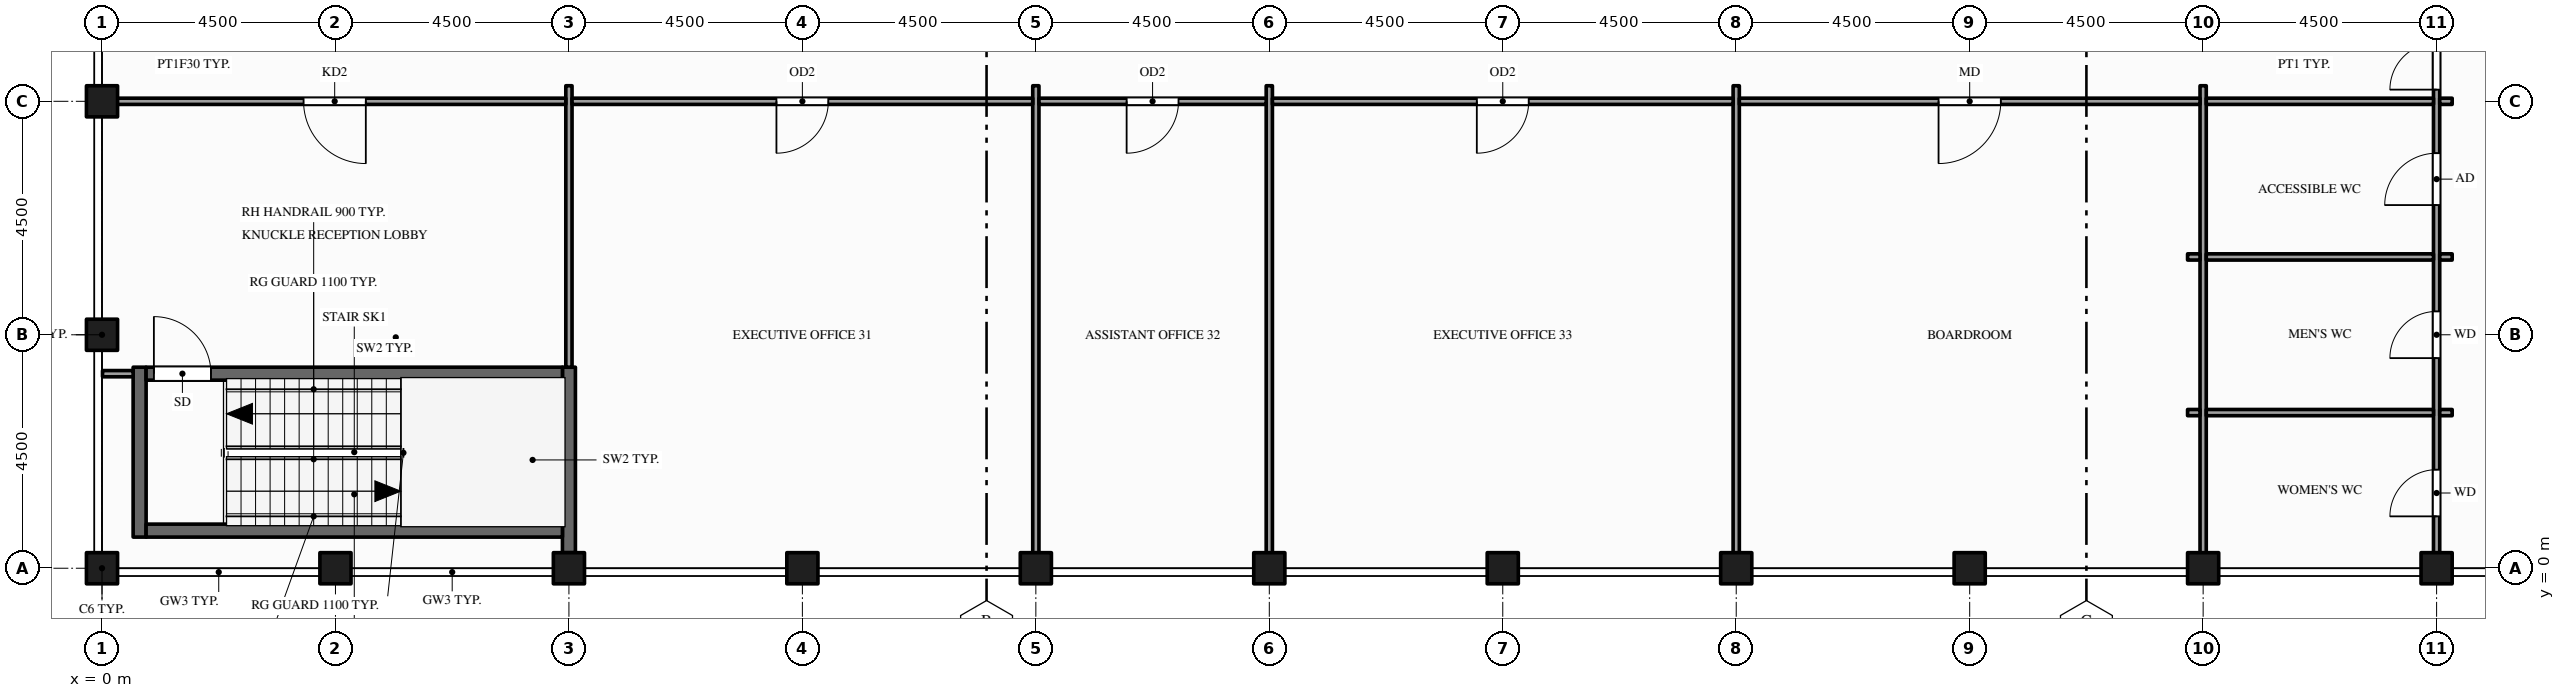
"""IFC4 building model, lengths in metres.
Left out: names, types, materials, properties, quantities, classifications, styles, units other than length and angle.
Written with IfcOpenShell. Run it as: python <this file> out.ifc"""

import sys

from ifc_helpers import new_model, si_unit, direction, frame, frame_2d, origin, origin_2d, place, context, subcontext, project, spatial, rectangle, hollow_rectangle, extrude, element, fill, save


model = new_model("IFC4")
c1 = context("Model", 3, precision=1e-05, world=origin(), true_north=direction((0.0, 1.0)))
c2 = subcontext(c1, "Body", "Model", "MODEL_VIEW")
j1 = project(units=[si_unit("LENGTHUNIT", "METRE"), si_unit("PLANEANGLEUNIT", "RADIAN")], contexts=[c1])
p1 = place(None, origin())
s1 = spatial("IfcSite", under=j1, at=p1, CompositionType="ELEMENT")
p2 = place(p1, origin())
s2 = spatial("IfcBuilding", under=s1, at=p2, CompositionType="ELEMENT")
p3 = place(p2, frame((0.0, 0.0, 305.0)))
s3 = spatial("IfcBuildingStorey", under=s2, at=p3, CompositionType="ELEMENT", Elevation=305.0)
for number, where, z_axis, x_axis in (
    (1, (0.0, 0.0, -0.15), (0.0, 0.0, 1.0), (1.0, 0.0, 0.0)),
    (2, (0.0, 4.5, -0.15), (0.0, 0.0, 1.0), (1.0, 0.0, 0.0)),
    (3, (0.0, 9.0, -0.15), (0.0, 0.0, 1.0), (1.0, 0.0, 0.0)),
    (4, (4.5, 0.0, -0.15), (0.0, 0.0, 1.0), (1.0, 0.0, 0.0)),
    (5, (9.0, 0.0, -0.15), (0.0, 0.0, 1.0), (1.0, 0.0, 0.0)),
    (6, (13.5, 0.0, -0.15), (0.0, 0.0, 1.0), (1.0, 0.0, 0.0)),
    (7, (18.0, 0.0, -0.15), (0.0, 0.0, 1.0), (1.0, 0.0, 0.0)),
    (8, (22.5, 0.0, -0.15), (0.0, 0.0, 1.0), (1.0, 0.0, 0.0)),
    (9, (27.0, 0.0, -0.15), (0.0, 0.0, 1.0), (1.0, 0.0, 0.0)),
    (10, (31.5, 0.0, -0.15), (0.0, 0.0, 1.0), (1.0, 0.0, 0.0)),
    (11, (36.0, 0.0, -0.15), (0.0, 0.0, 1.0), (1.0, 0.0, 0.0)),
    (12, (40.5, 0.0, -0.15), (0.0, 0.0, 1.0), (1.0, 0.0, 0.0)),
    (13, (45.0, 0.0, -0.15), (0.0, 0.0, 1.0), (1.0, 0.0, 0.0)),
):
    element("IfcColumn", number, at=place(p3, frame(where, z_axis=z_axis, x_axis=x_axis)), inside=s3, PredefinedType="COLUMN", context=c2, shape_type="SweptSolid", body=[
        extrude(hollow_rectangle(XDim=0.6, YDim=0.6, WallThickness=0.03, at=origin_2d()), origin(), (0.0, 0.0, 1.0), 4.5),
    ])
p4 = place(p3, frame((0.725, 0.6, 0.0), z_axis=(0.0, 0.0, 1.0), x_axis=(0.0, 1.0, 0.0)))
e14 = element("IfcWall", 14, at=p4, inside=s3, PredefinedType="SHEAR", context=c2, shape_type="SweptSolid", body=[
    extrude(rectangle(XDim=3.275, YDim=0.25, at=frame_2d((1.637, 0.0))), origin(), (0.0, 0.0, 1.0), 4.35),
])
p5 = place(p3, frame((9.0, 0.3, 0.0), z_axis=(0.0, 0.0, 1.0), x_axis=(0.0, 1.0, 0.0)))
e15 = element("IfcWall", 15, at=p5, inside=s3, PredefinedType="SHEAR", context=c2, shape_type="SweptSolid", body=[
    extrude(rectangle(XDim=3.575, YDim=0.25, at=frame_2d((1.788, 0.0))), origin(), (0.0, 0.0, 1.0), 4.35),
])
p6 = place(p3, frame((9.0, 3.875, 0.0), z_axis=(0.0, 0.0, 1.0), x_axis=(0.0, 1.0, 0.0)))
e16 = element("IfcWall", 16, at=p6, inside=s3, PredefinedType="PARTITIONING", context=c2, shape_type="SweptSolid", body=[
    extrude(rectangle(XDim=5.425, YDim=0.12, at=frame_2d((2.712, 0.0))), origin(), (0.0, 0.0, 1.0), 3.359),
])
for number, where, z_axis, x_axis in (
    (17, (18.0, 0.01, 0.0), (0.0, 0.0, 1.0), (0.0, 1.0, 0.0)),
    (18, (22.5, 0.01, 0.0), (0.0, 0.0, 1.0), (0.0, 1.0, 0.0)),
    (19, (31.5, 0.01, 0.0), (0.0, 0.0, 1.0), (0.0, 1.0, 0.0)),
    (20, (40.5, 0.01, 0.0), (0.0, 0.0, 1.0), (0.0, 1.0, 0.0)),
):
    element("IfcWall", number, at=place(p3, frame(where, z_axis=z_axis, x_axis=x_axis)), inside=s3, PredefinedType="PARTITIONING", context=c2, shape_type="SweptSolid", body=[
        extrude(rectangle(XDim=9.29, YDim=0.12, at=frame_2d((4.645, 0.0))), origin(), (0.0, 0.0, 1.0), 3.359),
    ])
p7 = place(p3, frame((45.0, 0.01, 0.0), z_axis=(0.0, 0.0, 1.0), x_axis=(0.0, 1.0, 0.0)))
e21 = element("IfcWall", 21, at=p7, inside=s3, PredefinedType="PARTITIONING", context=c2, shape_type="SweptSolid", body=[
    extrude(rectangle(XDim=22.48, YDim=0.12, at=frame_2d((11.24, 0.0))), origin(), (0.0, 0.0, 1.0), 3.359),
])
p8 = place(p7, frame((9.215, 0.0, 0.0)))
e22 = element("IfcOpeningElement", 22, at=p8, cuts=e21, PredefinedType="OPENING", context=c2, shape_type="SweptSolid", body=[
    extrude(rectangle(XDim=1.8, YDim=2.1, at=frame_2d((0.9, 1.05))), frame((0.0, 0.07, 0.0), z_axis=(0.0, -1.0, 0.0), x_axis=(1.0, 0.0, 0.0)), (0.0, 0.0, 1.0), 0.14),
])
p9 = place(p7, frame((0.99, 0.0, 0.0)))
e23 = element("IfcOpeningElement", 23, at=p9, cuts=e21, PredefinedType="OPENING", context=c2, shape_type="SweptSolid", body=[
    extrude(rectangle(XDim=0.9, YDim=2.1, at=frame_2d((0.45, 1.05))), frame((0.0, 0.07, 0.0), z_axis=(0.0, -1.0, 0.0), x_axis=(1.0, 0.0, 0.0)), (0.0, 0.0, 1.0), 0.14),
])
p10 = place(p7, frame((4.04, 0.0, 0.0)))
e24 = element("IfcOpeningElement", 24, at=p10, cuts=e21, PredefinedType="OPENING", context=c2, shape_type="SweptSolid", body=[
    extrude(rectangle(XDim=0.9, YDim=2.1, at=frame_2d((0.45, 1.05))), frame((0.0, 0.07, 0.0), z_axis=(0.0, -1.0, 0.0), x_axis=(1.0, 0.0, 0.0)), (0.0, 0.0, 1.0), 0.14),
])
p11 = place(p7, frame((6.99, 0.0, 0.0)))
e25 = element("IfcOpeningElement", 25, at=p11, cuts=e21, PredefinedType="OPENING", context=c2, shape_type="SweptSolid", body=[
    extrude(rectangle(XDim=1.0, YDim=2.1, at=frame_2d((0.5, 1.05))), frame((0.0, 0.07, 0.0), z_axis=(0.0, -1.0, 0.0), x_axis=(1.0, 0.0, 0.0)), (0.0, 0.0, 1.0), 0.14),
])
p12 = place(p3, frame((0.85, 0.725, 0.0), z_axis=(0.0, 0.0, 1.0), x_axis=(1.0, 0.0, 0.0)))
e26 = element("IfcWall", 26, at=p12, inside=s3, PredefinedType="SHEAR", context=c2, shape_type="SweptSolid", body=[
    extrude(rectangle(XDim=8.025, YDim=0.25, at=frame_2d((4.012, 0.0))), origin(), (0.0, 0.0, 1.0), 4.35),
])
p13 = place(p3, frame((40.2, 3.0, 0.0), z_axis=(0.0, 0.0, 1.0), x_axis=(1.0, 0.0, 0.0)))
e27 = element("IfcWall", 27, at=p13, inside=s3, PredefinedType="PARTITIONING", context=c2, shape_type="SweptSolid", body=[
    extrude(rectangle(XDim=0.24, YDim=0.12, at=frame_2d((0.12, 0.0))), origin(), (0.0, 0.0, 1.0), 3.359),
])
p14 = place(p3, frame((40.56, 3.0, 0.0), z_axis=(0.0, 0.0, 1.0), x_axis=(1.0, 0.0, 0.0)))
e28 = element("IfcWall", 28, at=p14, inside=s3, PredefinedType="PARTITIONING", context=c2, shape_type="SweptSolid", body=[
    extrude(rectangle(XDim=4.38, YDim=0.12, at=frame_2d((2.19, 0.0))), origin(), (0.0, 0.0, 1.0), 3.359),
])
p15 = place(p3, frame((45.06, 3.0, 0.0), z_axis=(0.0, 0.0, 1.0), x_axis=(1.0, 0.0, 0.0)))
e29 = element("IfcWall", 29, at=p15, inside=s3, PredefinedType="PARTITIONING", context=c2, shape_type="SweptSolid", body=[
    extrude(rectangle(XDim=0.24, YDim=0.12, at=frame_2d((0.12, 0.0))), origin(), (0.0, 0.0, 1.0), 3.359),
])
p16 = place(p3, frame((0.01, 3.75, 0.0), z_axis=(0.0, 0.0, 1.0), x_axis=(1.0, 0.0, 0.0)))
e30 = element("IfcWall", 30, at=p16, inside=s3, PredefinedType="PARTITIONING", context=c2, shape_type="SweptSolid", body=[
    extrude(rectangle(XDim=0.59, YDim=0.12, at=frame_2d((0.295, 0.0))), origin(), (0.0, 0.0, 1.0), 3.672),
])
p17 = place(p3, frame((0.85, 3.75, 0.0), z_axis=(0.0, 0.0, 1.0), x_axis=(1.0, 0.0, 0.0)))
e31 = element("IfcWall", 31, at=p17, inside=s3, PredefinedType="SHEAR", context=c2, shape_type="SweptSolid", body=[
    extrude(rectangle(XDim=8.025, YDim=0.25, at=frame_2d((4.012, 0.0))), origin(), (0.0, 0.0, 1.0), 4.35),
])
p18 = place(p17, frame((0.15, 0.0, 0.0)))
e32 = element("IfcOpeningElement", 32, at=p18, cuts=e31, PredefinedType="OPENING", context=c2, shape_type="SweptSolid", body=[
    extrude(rectangle(XDim=1.1, YDim=2.1, at=frame_2d((0.55, 1.05))), frame((0.0, 0.135, 0.0), z_axis=(0.0, -1.0, 0.0), x_axis=(1.0, 0.0, 0.0)), (0.0, 0.0, 1.0), 0.27),
])
p19 = place(p3, frame((40.2, 6.0, 0.0), z_axis=(0.0, 0.0, 1.0), x_axis=(1.0, 0.0, 0.0)))
e33 = element("IfcWall", 33, at=p19, inside=s3, PredefinedType="PARTITIONING", context=c2, shape_type="SweptSolid", body=[
    extrude(rectangle(XDim=0.24, YDim=0.12, at=frame_2d((0.12, 0.0))), origin(), (0.0, 0.0, 1.0), 3.359),
])
p20 = place(p3, frame((40.56, 6.0, 0.0), z_axis=(0.0, 0.0, 1.0), x_axis=(1.0, 0.0, 0.0)))
e34 = element("IfcWall", 34, at=p20, inside=s3, PredefinedType="PARTITIONING", context=c2, shape_type="SweptSolid", body=[
    extrude(rectangle(XDim=4.38, YDim=0.12, at=frame_2d((2.19, 0.0))), origin(), (0.0, 0.0, 1.0), 3.359),
])
p21 = place(p3, frame((45.06, 6.0, 0.0), z_axis=(0.0, 0.0, 1.0), x_axis=(1.0, 0.0, 0.0)))
e35 = element("IfcWall", 35, at=p21, inside=s3, PredefinedType="PARTITIONING", context=c2, shape_type="SweptSolid", body=[
    extrude(rectangle(XDim=0.24, YDim=0.12, at=frame_2d((0.12, 0.0))), origin(), (0.0, 0.0, 1.0), 3.359),
])
p22 = place(p3, frame((0.01, 9.0, 0.0), z_axis=(0.0, 0.0, 1.0), x_axis=(1.0, 0.0, 0.0)))
e36 = element("IfcWall", 36, at=p22, inside=s3, PredefinedType="PARTITIONING", context=c2, shape_type="SweptSolid", body=[
    extrude(rectangle(XDim=8.93, YDim=0.12, at=frame_2d((4.465, 0.0))), origin(), (0.0, 0.0, 1.0), 3.359),
])
p23 = place(p22, frame((3.875, 0.0, 0.0)))
e37 = element("IfcOpeningElement", 37, at=p23, cuts=e36, PredefinedType="OPENING", context=c2, shape_type="SweptSolid", body=[
    extrude(rectangle(XDim=1.2, YDim=2.1, at=frame_2d((0.6, 1.05))), frame((0.0, 0.07, 0.0), z_axis=(0.0, -1.0, 0.0), x_axis=(1.0, 0.0, 0.0)), (0.0, 0.0, 1.0), 0.14),
])
p24 = place(p3, frame((9.06, 9.0, 0.0), z_axis=(0.0, 0.0, 1.0), x_axis=(1.0, 0.0, 0.0)))
e38 = element("IfcWall", 38, at=p24, inside=s3, PredefinedType="PARTITIONING", context=c2, shape_type="SweptSolid", body=[
    extrude(rectangle(XDim=8.88, YDim=0.12, at=frame_2d((4.44, 0.0))), origin(), (0.0, 0.0, 1.0), 3.359),
])
p25 = place(p24, frame((3.94, 0.0, 0.0)))
e39 = element("IfcOpeningElement", 39, at=p25, cuts=e38, PredefinedType="OPENING", context=c2, shape_type="SweptSolid", body=[
    extrude(rectangle(XDim=1.0, YDim=2.1, at=frame_2d((0.5, 1.05))), frame((0.0, 0.07, 0.0), z_axis=(0.0, -1.0, 0.0), x_axis=(1.0, 0.0, 0.0)), (0.0, 0.0, 1.0), 0.14),
])
p26 = place(p3, frame((18.06, 9.0, 0.0), z_axis=(0.0, 0.0, 1.0), x_axis=(1.0, 0.0, 0.0)))
e40 = element("IfcWall", 40, at=p26, inside=s3, PredefinedType="PARTITIONING", context=c2, shape_type="SweptSolid", body=[
    extrude(rectangle(XDim=4.38, YDim=0.12, at=frame_2d((2.19, 0.0))), origin(), (0.0, 0.0, 1.0), 3.359),
])
p27 = place(p26, frame((1.69, 0.0, 0.0)))
e41 = element("IfcOpeningElement", 41, at=p27, cuts=e40, PredefinedType="OPENING", context=c2, shape_type="SweptSolid", body=[
    extrude(rectangle(XDim=1.0, YDim=2.1, at=frame_2d((0.5, 1.05))), frame((0.0, 0.07, 0.0), z_axis=(0.0, -1.0, 0.0), x_axis=(1.0, 0.0, 0.0)), (0.0, 0.0, 1.0), 0.14),
])
p28 = place(p3, frame((22.56, 9.0, 0.0), z_axis=(0.0, 0.0, 1.0), x_axis=(1.0, 0.0, 0.0)))
e42 = element("IfcWall", 42, at=p28, inside=s3, PredefinedType="PARTITIONING", context=c2, shape_type="SweptSolid", body=[
    extrude(rectangle(XDim=8.88, YDim=0.12, at=frame_2d((4.44, 0.0))), origin(), (0.0, 0.0, 1.0), 3.359),
])
p29 = place(p28, frame((3.94, 0.0, 0.0)))
e43 = element("IfcOpeningElement", 43, at=p29, cuts=e42, PredefinedType="OPENING", context=c2, shape_type="SweptSolid", body=[
    extrude(rectangle(XDim=1.0, YDim=2.1, at=frame_2d((0.5, 1.05))), frame((0.0, 0.07, 0.0), z_axis=(0.0, -1.0, 0.0), x_axis=(1.0, 0.0, 0.0)), (0.0, 0.0, 1.0), 0.14),
])
p30 = place(p3, frame((31.56, 9.0, 0.0), z_axis=(0.0, 0.0, 1.0), x_axis=(1.0, 0.0, 0.0)))
e44 = element("IfcWall", 44, at=p30, inside=s3, PredefinedType="PARTITIONING", context=c2, shape_type="SweptSolid", body=[
    extrude(rectangle(XDim=8.88, YDim=0.12, at=frame_2d((4.44, 0.0))), origin(), (0.0, 0.0, 1.0), 3.359),
])
p31 = place(p30, frame((3.84, 0.0, 0.0)))
e45 = element("IfcOpeningElement", 45, at=p31, cuts=e44, PredefinedType="OPENING", context=c2, shape_type="SweptSolid", body=[
    extrude(rectangle(XDim=1.2, YDim=2.1, at=frame_2d((0.6, 1.05))), frame((0.0, 0.07, 0.0), z_axis=(0.0, -1.0, 0.0), x_axis=(1.0, 0.0, 0.0)), (0.0, 0.0, 1.0), 0.14),
])
p32 = place(p3, frame((40.56, 9.0, 0.0), z_axis=(0.0, 0.0, 1.0), x_axis=(1.0, 0.0, 0.0)))
e46 = element("IfcWall", 46, at=p32, inside=s3, PredefinedType="PARTITIONING", context=c2, shape_type="SweptSolid", body=[
    extrude(rectangle(XDim=4.38, YDim=0.12, at=frame_2d((2.19, 0.0))), origin(), (0.0, 0.0, 1.0), 3.359),
])
p33 = place(p3, frame((45.06, 9.0, 0.0), z_axis=(0.0, 0.0, 1.0), x_axis=(1.0, 0.0, 0.0)))
e47 = element("IfcWall", 47, at=p33, inside=s3, PredefinedType="PARTITIONING", context=c2, shape_type="SweptSolid", body=[
    extrude(rectangle(XDim=0.24, YDim=0.12, at=frame_2d((0.12, 0.0))), origin(), (0.0, 0.0, 1.0), 3.359),
])
p34 = place(p8, origin())
e48 = element("IfcDoor", 48, at=p34, inside=s3, OperationType="DOUBLE_DOOR_SINGLE_SWING", PredefinedType="DOOR", context=c2, shape_type="SweptSolid", body=[
    extrude(rectangle(XDim=1.8, YDim=2.1, at=frame_2d((0.9, 1.05))), frame((0.0, 0.025, 0.0), z_axis=(0.0, -1.0, 0.0), x_axis=(1.0, 0.0, 0.0)), (0.0, 0.0, 1.0), 0.05),
])
fill(e22, e48)
p35 = place(p18, origin())
e49 = element("IfcDoor", 49, at=p35, inside=s3, OperationType="SINGLE_SWING_LEFT", PredefinedType="DOOR", context=c2, shape_type="SweptSolid", body=[
    extrude(rectangle(XDim=1.1, YDim=2.1, at=frame_2d((0.55, 1.05))), frame((0.0, 0.025, 0.0), z_axis=(0.0, -1.0, 0.0), x_axis=(1.0, 0.0, 0.0)), (0.0, 0.0, 1.0), 0.05),
])
fill(e32, e49)
p36 = place(p23, origin())
e50 = element("IfcDoor", 50, at=p36, inside=s3, OperationType="SINGLE_SWING_RIGHT", PredefinedType="DOOR", context=c2, shape_type="SweptSolid", body=[
    extrude(rectangle(XDim=1.2, YDim=2.1, at=frame_2d((0.6, 1.05))), frame((0.0, 0.025, 0.0), z_axis=(0.0, -1.0, 0.0), x_axis=(1.0, 0.0, 0.0)), (0.0, 0.0, 1.0), 0.05),
])
fill(e37, e50)
p37 = place(p25, origin())
e51 = element("IfcDoor", 51, at=p37, inside=s3, OperationType="SINGLE_SWING_LEFT", PredefinedType="DOOR", context=c2, shape_type="SweptSolid", body=[
    extrude(rectangle(XDim=1.0, YDim=2.1, at=frame_2d((0.5, 1.05))), frame((0.0, 0.025, 0.0), z_axis=(0.0, -1.0, 0.0), x_axis=(1.0, 0.0, 0.0)), (0.0, 0.0, 1.0), 0.05),
])
fill(e39, e51)
p38 = place(p27, origin())
e52 = element("IfcDoor", 52, at=p38, inside=s3, OperationType="SINGLE_SWING_LEFT", PredefinedType="DOOR", context=c2, shape_type="SweptSolid", body=[
    extrude(rectangle(XDim=1.0, YDim=2.1, at=frame_2d((0.5, 1.05))), frame((0.0, 0.025, 0.0), z_axis=(0.0, -1.0, 0.0), x_axis=(1.0, 0.0, 0.0)), (0.0, 0.0, 1.0), 0.05),
])
fill(e41, e52)
p39 = place(p29, origin())
e53 = element("IfcDoor", 53, at=p39, inside=s3, OperationType="SINGLE_SWING_LEFT", PredefinedType="DOOR", context=c2, shape_type="SweptSolid", body=[
    extrude(rectangle(XDim=1.0, YDim=2.1, at=frame_2d((0.5, 1.05))), frame((0.0, 0.025, 0.0), z_axis=(0.0, -1.0, 0.0), x_axis=(1.0, 0.0, 0.0)), (0.0, 0.0, 1.0), 0.05),
])
fill(e43, e53)
p40 = place(p31, origin())
e54 = element("IfcDoor", 54, at=p40, inside=s3, OperationType="SINGLE_SWING_LEFT", PredefinedType="DOOR", context=c2, shape_type="SweptSolid", body=[
    extrude(rectangle(XDim=1.2, YDim=2.1, at=frame_2d((0.6, 1.05))), frame((0.0, 0.025, 0.0), z_axis=(0.0, -1.0, 0.0), x_axis=(1.0, 0.0, 0.0)), (0.0, 0.0, 1.0), 0.05),
])
fill(e45, e54)
p41 = place(p9, origin())
e55 = element("IfcDoor", 55, at=p41, inside=s3, OperationType="SINGLE_SWING_LEFT", PredefinedType="DOOR", context=c2, shape_type="SweptSolid", body=[
    extrude(rectangle(XDim=0.9, YDim=2.1, at=frame_2d((0.45, 1.05))), frame((0.0, 0.025, 0.0), z_axis=(0.0, -1.0, 0.0), x_axis=(1.0, 0.0, 0.0)), (0.0, 0.0, 1.0), 0.05),
])
fill(e23, e55)
p42 = place(p10, origin())
e56 = element("IfcDoor", 56, at=p42, inside=s3, OperationType="SINGLE_SWING_LEFT", PredefinedType="DOOR", context=c2, shape_type="SweptSolid", body=[
    extrude(rectangle(XDim=0.9, YDim=2.1, at=frame_2d((0.45, 1.05))), frame((0.0, 0.025, 0.0), z_axis=(0.0, -1.0, 0.0), x_axis=(1.0, 0.0, 0.0)), (0.0, 0.0, 1.0), 0.05),
])
fill(e24, e56)
p43 = place(p11, origin())
e57 = element("IfcDoor", 57, at=p43, inside=s3, OperationType="SINGLE_SWING_LEFT", PredefinedType="DOOR", context=c2, shape_type="SweptSolid", body=[
    extrude(rectangle(XDim=1.0, YDim=2.1, at=frame_2d((0.5, 1.05))), frame((0.0, 0.025, 0.0), z_axis=(0.0, -1.0, 0.0), x_axis=(1.0, 0.0, 0.0)), (0.0, 0.0, 1.0), 0.05),
])
fill(e25, e57)
save(model, sys.argv[1])
